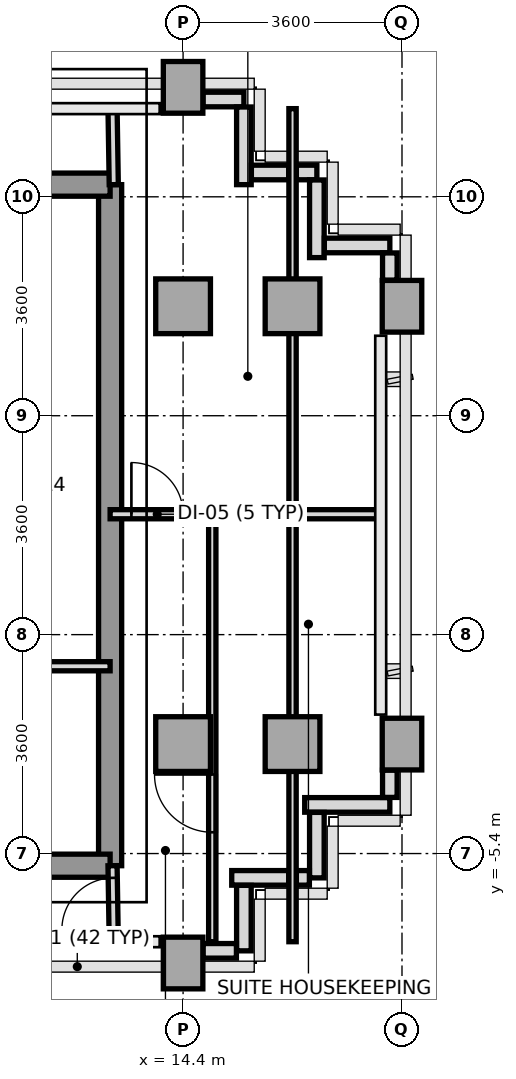
"""IFC4 building model, lengths in metres.
Left out: names, types, materials, properties, quantities, classifications, styles, units other than length and angle.
Written with IfcOpenShell. Run it as: python <this file> out.ifc"""

import sys

from ifc_helpers import new_model, si_unit, direction, frame, frame_2d, origin, origin_2d, place, context, subcontext, project, spatial, rectangle, extrude, source, transform, mapped, element, fill, save


model = new_model("IFC4")
c1 = context("Model", 3, precision=1e-05, world=origin(), true_north=direction((0.0, 1.0)))
c2 = subcontext(c1, "Body", "Model", "MODEL_VIEW")
j1 = project(units=[si_unit("LENGTHUNIT", "METRE"), si_unit("PLANEANGLEUNIT", "RADIAN")], contexts=[c1])
p1 = place(None, origin())
s1 = spatial("IfcSite", under=j1, at=p1, CompositionType="ELEMENT")
p2 = place(p1, origin())
s2 = spatial("IfcBuilding", under=s1, at=p2, CompositionType="ELEMENT")
p3 = place(p2, frame((0.0, 0.0, 197.8)))
s3 = spatial("IfcBuildingStorey", under=s2, at=p3, CompositionType="ELEMENT", Elevation=197.8)
m1 = source(origin(), c2, "Body", "SweptSolid", [
    extrude(rectangle(XDim=0.65, YDim=0.85, at=origin_2d()), origin(), (0.0, 0.0, 1.0), 3.2),
])
p4 = place(p3, frame((14.4, -7.2, 0.0), z_axis=(0.0, 0.0, 1.0), x_axis=(1.0, 0.0, 0.0)))
e1 = element("IfcColumn", 1, at=p4, inside=s3, PredefinedType="COLUMN", context=c2, shape_type="MappedRepresentation", body=[
    mapped(m1, transform((0.0, 0.0, 0.0), x_axis=(1.0, 0.0, 0.0), y_axis=(0.0, 1.0, 0.0), z_axis=(0.0, 0.0, 1.0), scale=1.0)),
])
m2 = source(origin(), c2, "Body", "SweptSolid", [
    extrude(rectangle(XDim=0.9, YDim=0.9, at=origin_2d()), origin(), (0.0, 0.0, 1.0), 3.2),
])
for number, where, z_axis, x_axis in (
    (2, (14.4, -3.6, 0.0), (0.0, 0.0, 1.0), (1.0, 0.0, 0.0)),
    (3, (14.4, 3.6, 0.0), (0.0, 0.0, 1.0), (1.0, 0.0, 0.0)),
):
    element("IfcColumn", number, at=place(p3, frame(where, z_axis=z_axis, x_axis=x_axis)), inside=s3, PredefinedType="COLUMN", context=c2, shape_type="MappedRepresentation", body=[
        mapped(m2, transform((0.0, 0.0, 0.0), x_axis=(1.0, 0.0, 0.0), y_axis=(0.0, 1.0, 0.0), z_axis=(0.0, 0.0, 1.0), scale=1.0)),
    ])
p5 = place(p3, frame((14.4, 7.2, 0.0), z_axis=(0.0, 0.0, 1.0), x_axis=(1.0, 0.0, 0.0)))
e4 = element("IfcColumn", 4, at=p5, inside=s3, PredefinedType="COLUMN", context=c2, shape_type="MappedRepresentation", body=[
    mapped(m1, transform((0.0, 0.0, 0.0), x_axis=(1.0, 0.0, 0.0), y_axis=(0.0, 1.0, 0.0), z_axis=(0.0, 0.0, 1.0), scale=1.0)),
])
for number, where, z_axis, x_axis in (
    (5, (16.2, -3.6, 0.0), (0.0, 0.0, 1.0), (1.0, 0.0, 0.0)),
    (6, (16.2, 3.6, 0.0), (0.0, 0.0, 1.0), (1.0, 0.0, 0.0)),
):
    element("IfcColumn", number, at=place(p3, frame(where, z_axis=z_axis, x_axis=x_axis)), inside=s3, PredefinedType="COLUMN", context=c2, shape_type="MappedRepresentation", body=[
        mapped(m2, transform((0.0, 0.0, 0.0), x_axis=(1.0, 0.0, 0.0), y_axis=(0.0, 1.0, 0.0), z_axis=(0.0, 0.0, 1.0), scale=1.0)),
    ])
for number, where, z_axis, x_axis in (
    (7, (18.0, -3.6, 0.0), (0.0, 0.0, 1.0), (1.0, 0.0, 0.0)),
    (8, (18.0, 3.6, 0.0), (0.0, 0.0, 1.0), (1.0, 0.0, 0.0)),
):
    element("IfcColumn", number, at=place(p3, frame(where, z_axis=z_axis, x_axis=x_axis)), inside=s3, PredefinedType="COLUMN", context=c2, shape_type="MappedRepresentation", body=[
        mapped(m1, transform((0.0, 0.0, 0.0), x_axis=(1.0, 0.0, 0.0), y_axis=(0.0, 1.0, 0.0), z_axis=(0.0, 0.0, 1.0), scale=1.0)),
    ])
p6 = place(p3, frame((17.8, -4.6, 0.0), z_axis=(0.0, 0.0, 1.0), x_axis=(-1.0, 0.0, 0.0)))
e9 = element("IfcWall", 9, at=p6, inside=s3, PredefinedType="PARAPET", context=c2, shape_type="SweptSolid", body=[
    extrude(rectangle(XDim=1.4, YDim=0.24, at=frame_2d((0.7, 0.0))), origin(), (0.0, 0.0, 1.0), 1.15),
])
p7 = place(p3, frame((16.6, -4.723, 0.0), z_axis=(0.0, 0.0, 1.0), x_axis=(0.0, -1.0, 0.0)))
e10 = element("IfcWall", 10, at=p7, inside=s3, PredefinedType="PARAPET", context=c2, shape_type="SweptSolid", body=[
    extrude(rectangle(XDim=1.077, YDim=0.24, at=frame_2d((0.539, 0.0))), origin(), (0.0, 0.0, 1.0), 1.15),
])
p8 = place(p3, frame((16.477, -5.8, 0.0), z_axis=(0.0, 0.0, 1.0), x_axis=(-1.0, 0.0, 0.0)))
e11 = element("IfcWall", 11, at=p8, inside=s3, PredefinedType="PARAPET", context=c2, shape_type="SweptSolid", body=[
    extrude(rectangle(XDim=0.214, YDim=0.24, at=frame_2d((0.107, 0.0))), origin(), (0.0, 0.0, 1.0), 1.15),
])
p9 = place(p3, frame((16.137, -5.8, 0.0), z_axis=(0.0, 0.0, 1.0), x_axis=(-1.0, 0.0, 0.0)))
e12 = element("IfcWall", 12, at=p9, inside=s3, PredefinedType="PARAPET", context=c2, shape_type="SweptSolid", body=[
    extrude(rectangle(XDim=0.937, YDim=0.24, at=frame_2d((0.469, 0.0))), origin(), (0.0, 0.0, 1.0), 1.15),
])
p10 = place(p3, frame((15.4, -5.923, 0.0), z_axis=(0.0, 0.0, 1.0), x_axis=(0.0, -1.0, 0.0)))
e13 = element("IfcWall", 13, at=p10, inside=s3, PredefinedType="PARAPET", context=c2, shape_type="SweptSolid", body=[
    extrude(rectangle(XDim=1.077, YDim=0.24, at=frame_2d((0.539, 0.0))), origin(), (0.0, 0.0, 1.0), 1.15),
])
p11 = place(p3, frame((15.277, -7.0, 0.0), z_axis=(0.0, 0.0, 1.0), x_axis=(-1.0, 0.0, 0.0)))
e14 = element("IfcWall", 14, at=p11, inside=s3, PredefinedType="PARAPET", context=c2, shape_type="SweptSolid", body=[
    extrude(rectangle(XDim=0.549, YDim=0.24, at=frame_2d((0.274, 0.0))), origin(), (0.0, 0.0, 1.0), 1.15),
])
p12 = place(p3, frame((14.728, 7.0, 0.0), z_axis=(0.0, 0.0, 1.0), x_axis=(1.0, 0.0, 0.0)))
e15 = element("IfcWall", 15, at=p12, inside=s3, PredefinedType="PARAPET", context=c2, shape_type="SweptSolid", body=[
    extrude(rectangle(XDim=0.672, YDim=0.24, at=frame_2d((0.336, 0.0))), origin(), (0.0, 0.0, 1.0), 1.15),
])
p13 = place(p3, frame((15.4, 6.877, 0.0), z_axis=(0.0, 0.0, 1.0), x_axis=(0.0, -1.0, 0.0)))
e16 = element("IfcWall", 16, at=p13, inside=s3, PredefinedType="PARAPET", context=c2, shape_type="SweptSolid", body=[
    extrude(rectangle(XDim=1.277, YDim=0.24, at=frame_2d((0.638, 0.0))), origin(), (0.0, 0.0, 1.0), 1.15),
])
p14 = place(p3, frame((15.523, 5.8, 0.0), z_axis=(0.0, 0.0, 1.0), x_axis=(1.0, 0.0, 0.0)))
e17 = element("IfcWall", 17, at=p14, inside=s3, PredefinedType="PARAPET", context=c2, shape_type="SweptSolid", body=[
    extrude(rectangle(XDim=0.614, YDim=0.24, at=frame_2d((0.307, 0.0))), origin(), (0.0, 0.0, 1.0), 1.15),
])
p15 = place(p3, frame((16.263, 5.8, 0.0), z_axis=(0.0, 0.0, 1.0), x_axis=(1.0, 0.0, 0.0)))
e18 = element("IfcWall", 18, at=p15, inside=s3, PredefinedType="PARAPET", context=c2, shape_type="SweptSolid", body=[
    extrude(rectangle(XDim=0.337, YDim=0.24, at=frame_2d((0.168, 0.0))), origin(), (0.0, 0.0, 1.0), 1.15),
])
p16 = place(p3, frame((16.6, 5.677, 0.0), z_axis=(0.0, 0.0, 1.0), x_axis=(0.0, -1.0, 0.0)))
e19 = element("IfcWall", 19, at=p16, inside=s3, PredefinedType="PARAPET", context=c2, shape_type="SweptSolid", body=[
    extrude(rectangle(XDim=1.277, YDim=0.24, at=frame_2d((0.639, 0.0))), origin(), (0.0, 0.0, 1.0), 1.15),
])
p17 = place(p3, frame((16.723, 4.6, 0.0), z_axis=(0.0, 0.0, 1.0), x_axis=(1.0, 0.0, 0.0)))
e20 = element("IfcWall", 20, at=p17, inside=s3, PredefinedType="PARAPET", context=c2, shape_type="SweptSolid", body=[
    extrude(rectangle(XDim=1.077, YDim=0.24, at=frame_2d((0.539, 0.0))), origin(), (0.0, 0.0, 1.0), 1.15),
])
for number, where, z_axis, x_axis in (
    (21, (17.8, 4.477, 0.0), (0.0, 0.0, 1.0), (0.0, -1.0, 0.0)),
    (22, (17.8, -4.028, 0.0), (0.0, 0.0, 1.0), (0.0, -1.0, 0.0)),
):
    element("IfcWall", number, at=place(p3, frame(where, z_axis=z_axis, x_axis=x_axis)), inside=s3, PredefinedType="PARAPET", context=c2, shape_type="SweptSolid", body=[
        extrude(rectangle(XDim=0.449, YDim=0.24, at=frame_2d((0.225, 0.0))), origin(), (0.0, 0.0, 1.0), 1.15),
    ])
p18 = place(p3, frame((13.2, -5.6, 0.0), z_axis=(0.0, 0.0, 1.0), x_axis=(0.0, 1.0, 0.0)))
e23 = element("IfcWall", 23, at=p18, inside=s3, PredefinedType="SHEAR", context=c2, shape_type="SweptSolid", body=[
    extrude(rectangle(XDim=11.2, YDim=0.38, at=frame_2d((5.6, 0.0))), origin(), (0.0, 0.0, 1.0), 3.2),
])
p19 = place(p3, frame((11.356, 5.6, 0.0), z_axis=(0.0, 0.0, 1.0), x_axis=(1.0, 0.0, 0.0)))
e24 = element("IfcWall", 24, at=p19, inside=s3, PredefinedType="SHEAR", context=c2, shape_type="SweptSolid", body=[
    extrude(rectangle(XDim=1.844, YDim=0.38, at=frame_2d((0.922, 0.0))), origin(), (0.0, 0.0, 1.0), 3.2),
])
p20 = place(p3, frame((5.4, -5.6, 0.0), z_axis=(0.0, 0.0, 1.0), x_axis=(1.0, 0.0, 0.0)))
e25 = element("IfcWall", 25, at=p20, inside=s3, PredefinedType="SHEAR", context=c2, shape_type="SweptSolid", body=[
    extrude(rectangle(XDim=7.8, YDim=0.38, at=frame_2d((3.9, 0.0))), origin(), (0.0, 0.0, 1.0), 3.2),
])
p21 = place(p20, frame((5.85, 0.0, 0.0)))
e26 = element("IfcOpeningElement", 26, at=p21, cuts=e25, PredefinedType="OPENING", context=c2, shape_type="SweptSolid", body=[
    extrude(rectangle(XDim=0.8, YDim=2.1, at=frame_2d((0.4, 1.05))), frame((0.0, 0.2, 0.0), z_axis=(0.0, -1.0, 0.0), x_axis=(1.0, 0.0, 0.0)), (0.0, 0.0, 1.0), 0.4),
])
p22 = place(p20, frame((3.4, 0.0, 0.0)))
e27 = element("IfcOpeningElement", 27, at=p22, cuts=e25, PredefinedType="OPENING", context=c2, shape_type="SweptSolid", body=[
    extrude(rectangle(XDim=0.95, YDim=2.15, at=frame_2d((0.475, 1.075))), frame((0.0, 0.2, 0.0), z_axis=(0.0, -1.0, 0.0), x_axis=(1.0, 0.0, 0.0)), (0.0, 0.0, 1.0), 0.4),
])
p23 = place(p3, frame((11.02, -2.32, 0.0), z_axis=(0.0, 0.0, 1.0), x_axis=(1.0, 0.0, 0.0)))
e28 = element("IfcWall", 28, at=p23, inside=s3, PredefinedType="PARTITIONING", context=c2, shape_type="SweptSolid", body=[
    extrude(rectangle(XDim=2.18, YDim=0.15, at=frame_2d((1.09, 0.0))), origin(), (0.0, 0.0, 1.0), 3.2),
])
p24 = place(p3, frame((13.26, 5.6, 0.0), z_axis=(0.0, 0.0, 1.0), x_axis=(-0.016013571389, 0.999871774545, 0.0)))
e29 = element("IfcWall", 29, at=p24, inside=s3, PredefinedType="PARTITIONING", context=c2, shape_type="SweptSolid", body=[
    extrude(rectangle(XDim=1.25, YDim=0.15, at=frame_2d((0.625, 0.0))), origin(), (0.0, 0.0, 1.0), 3.2),
])
p25 = place(p3, frame((13.26, -6.85, 0.0), z_axis=(0.0, 0.0, 1.0), x_axis=(-0.016013571389, 0.999871774545, 0.0)))
e30 = element("IfcWall", 30, at=p25, inside=s3, PredefinedType="PARTITIONING", context=c2, shape_type="SweptSolid", body=[
    extrude(rectangle(XDim=1.25, YDim=0.15, at=frame_2d((0.625, 0.0))), origin(), (0.0, 0.0, 1.0), 3.2),
])
p26 = place(p25, frame((0.2, 0.0, 0.0)))
e31 = element("IfcOpeningElement", 31, at=p26, cuts=e30, PredefinedType="OPENING", context=c2, shape_type="SweptSolid", body=[
    extrude(rectangle(XDim=0.85, YDim=2.1, at=frame_2d((0.425, 1.05))), frame((0.0, 0.085, 0.0), z_axis=(0.0, -1.0, 0.0), x_axis=(1.0, 0.0, 0.0)), (0.0, 0.0, 1.0), 0.17),
])
p27 = place(p3, frame((16.2, -6.85, 0.0), z_axis=(0.0, 0.0, 1.0), x_axis=(0.0, 1.0, 0.0)))
e32 = element("IfcWall", 32, at=p27, inside=s3, PredefinedType="PARTITIONING", context=c2, shape_type="SweptSolid", body=[
    extrude(rectangle(XDim=13.7, YDim=0.12, at=frame_2d((6.85, 0.0))), origin(), (0.0, 0.0, 1.0), 2.8),
])
p28 = place(p3, frame((14.9, 0.18, 0.0), z_axis=(0.0, 0.0, 1.0), x_axis=(1.0, 0.0, 0.0)))
e33 = element("IfcWall", 33, at=p28, inside=s3, PredefinedType="PARTITIONING", context=c2, shape_type="SweptSolid", body=[
    extrude(rectangle(XDim=2.75, YDim=0.15, at=frame_2d((1.375, 0.0))), origin(), (0.0, 0.0, 1.0), 2.8),
])
p29 = place(p3, frame((14.88, -6.85, 0.0), z_axis=(0.0, 0.0, 1.0), x_axis=(0.0, 1.0, 0.0)))
e34 = element("IfcWall", 34, at=p29, inside=s3, PredefinedType="PARTITIONING", context=c2, shape_type="SweptSolid", body=[
    extrude(rectangle(XDim=7.03, YDim=0.12, at=frame_2d((3.515, 0.0))), origin(), (0.0, 0.0, 1.0), 3.2),
])
p30 = place(p29, frame((1.8, 0.0, 0.0)))
e35 = element("IfcOpeningElement", 35, at=p30, cuts=e34, PredefinedType="OPENING", context=c2, shape_type="SweptSolid", body=[
    extrude(rectangle(XDim=0.95, YDim=2.15, at=frame_2d((0.475, 1.075))), frame((0.0, 0.07, 0.0), z_axis=(0.0, -1.0, 0.0), x_axis=(1.0, 0.0, 0.0)), (0.0, 0.0, 1.0), 0.14),
])
p31 = place(p3, frame((13.2, 0.18, 0.0), z_axis=(0.0, 0.0, 1.0), x_axis=(1.0, 0.0, 0.0)))
e36 = element("IfcWall", 36, at=p31, inside=s3, PredefinedType="PARTITIONING", context=c2, shape_type="SweptSolid", body=[
    extrude(rectangle(XDim=1.7, YDim=0.15, at=frame_2d((0.85, 0.0))), origin(), (0.0, 0.0, 1.0), 2.8),
])
p32 = place(p31, frame((0.35, 0.0, 0.0)))
e37 = element("IfcOpeningElement", 37, at=p32, cuts=e36, PredefinedType="OPENING", context=c2, shape_type="SweptSolid", body=[
    extrude(rectangle(XDim=0.85, YDim=2.1, at=frame_2d((0.425, 1.05))), frame((0.0, 0.085, 0.0), z_axis=(0.0, -1.0, 0.0), x_axis=(1.0, 0.0, 0.0)), (0.0, 0.0, 1.0), 0.17),
])
m3 = source(origin(), c2, "Body", "SweptSolid", [
    extrude(rectangle(XDim=0.85, YDim=2.1, at=frame_2d((0.425, 1.05))), frame((0.0, 0.025, 0.0), z_axis=(0.0, -1.0, 0.0), x_axis=(1.0, 0.0, 0.0)), (0.0, 0.0, 1.0), 0.05),
])
p33 = place(p26, origin())
e38 = element("IfcDoor", 38, at=p33, inside=s3, OperationType="SINGLE_SWING_LEFT", PredefinedType="DOOR", context=c2, shape_type="MappedRepresentation", body=[
    mapped(m3, transform((0.0, 0.0, 0.0), x_axis=(1.0, 0.0, 0.0), y_axis=(0.0, 1.0, 0.0), z_axis=(0.0, 0.0, 1.0), scale=1.0)),
])
fill(e31, e38)
m4 = source(origin(), c2, "Body", "SweptSolid", [
    extrude(rectangle(XDim=0.95, YDim=2.15, at=frame_2d((0.475, 1.075))), frame((0.0, 0.025, 0.0), z_axis=(0.0, -1.0, 0.0), x_axis=(1.0, 0.0, 0.0)), (0.0, 0.0, 1.0), 0.05),
])
p34 = place(p30, origin())
e39 = element("IfcDoor", 39, at=p34, inside=s3, OperationType="SINGLE_SWING_RIGHT", PredefinedType="DOOR", context=c2, shape_type="MappedRepresentation", body=[
    mapped(m4, transform((0.0, 0.0, 0.0), x_axis=(1.0, 0.0, 0.0), y_axis=(0.0, 1.0, 0.0), z_axis=(0.0, 0.0, 1.0), scale=1.0)),
])
fill(e35, e39)
p35 = place(p32, origin())
e40 = element("IfcDoor", 40, at=p35, inside=s3, OperationType="SINGLE_SWING_LEFT", PredefinedType="DOOR", context=c2, shape_type="MappedRepresentation", body=[
    mapped(m3, transform((0.0, 0.0, 0.0), x_axis=(1.0, 0.0, 0.0), y_axis=(0.0, 1.0, 0.0), z_axis=(0.0, 0.0, 1.0), scale=1.0)),
])
fill(e37, e40)
save(model, sys.argv[1])
